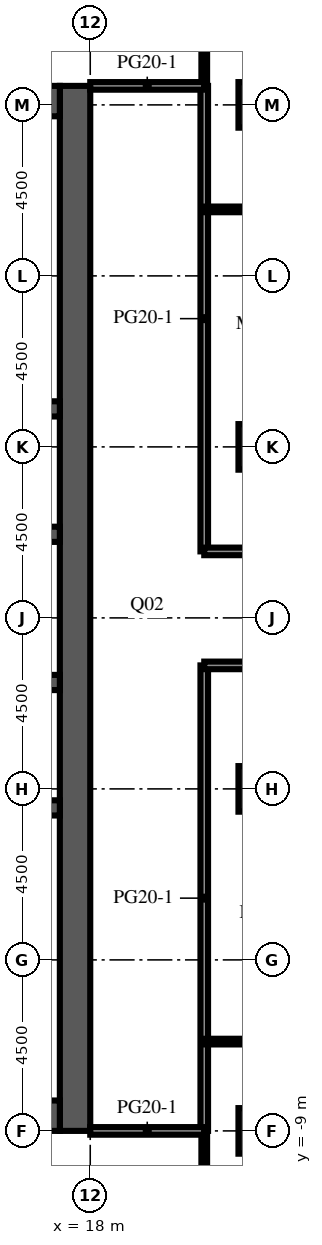
"""IFC4 building model, lengths in metres.
Left out: names, types, materials, properties, quantities, classifications, styles, units other than length and angle.
Written with IfcOpenShell. Run it as: python <this file> out.ifc"""

import sys

from ifc_helpers import new_model, si_unit, direction, frame, frame_2d, origin, origin_2d, place, context, subcontext, project, spatial, rectangle, extrude, element, fill, save


model = new_model("IFC4")
c1 = context("Model", 3, precision=1e-05, world=origin(), true_north=direction((0.0, 1.0)))
c2 = subcontext(c1, "Body", "Model", "MODEL_VIEW")
j1 = project(units=[si_unit("LENGTHUNIT", "METRE"), si_unit("PLANEANGLEUNIT", "RADIAN")], contexts=[c1])
p1 = place(None, origin())
s1 = spatial("IfcSite", under=j1, at=p1, CompositionType="ELEMENT")
p2 = place(p1, origin())
s2 = spatial("IfcBuilding", under=s1, at=p2, CompositionType="ELEMENT")
p3 = place(p2, frame((0.0, 0.0, 191.5)))
s3 = spatial("IfcBuildingStorey", under=s2, at=p3, CompositionType="ELEMENT", Elevation=191.5)
for number, where, z_axis, x_axis in (
    (1, (22.5, -9.0, -0.45), (0.0, 0.0, 1.0), (1.0, 0.0, 0.0)),
    (2, (22.5, 0.0, -0.45), (0.0, 0.0, 1.0), (1.0, 0.0, 0.0)),
    (3, (22.5, 9.0, -0.45), (0.0, 0.0, 1.0), (1.0, 0.0, 0.0)),
    (4, (22.5, 18.0, -0.45), (0.0, 0.0, 1.0), (1.0, 0.0, 0.0)),
):
    element("IfcColumn", number, at=place(p3, frame(where, z_axis=z_axis, x_axis=x_axis)), inside=s3, PredefinedType="COLUMN", context=c2, shape_type="SweptSolid", body=[
        extrude(rectangle(XDim=1.2, YDim=1.2, at=origin_2d()), origin(), (0.0, 0.0, 1.0), 4.55),
    ])
p4 = place(p3, frame((17.6, -9.0, 0.0), z_axis=(0.0, 0.0, 1.0), x_axis=(0.0, 1.0, 0.0)))
e5 = element("IfcWall", 5, at=p4, inside=s3, PredefinedType="SHEAR", context=c2, shape_type="SweptSolid", body=[
    extrude(rectangle(XDim=27.5, YDim=0.8, at=frame_2d((13.75, 0.0))), origin(), (0.0, 0.0, 1.0), 4.1),
])
p5 = place(p4, frame((12.55, 0.0, 0.0)))
e6 = element("IfcOpeningElement", 6, at=p5, cuts=e5, PredefinedType="OPENING", context=c2, shape_type="SweptSolid", body=[
    extrude(rectangle(XDim=2.4, YDim=2.4, at=frame_2d((1.2, 1.2))), frame((0.0, 0.41, 0.0), z_axis=(0.0, -1.0, 0.0), x_axis=(1.0, 0.0, 0.0)), (0.0, 0.0, 1.0), 0.82),
])
p6 = place(p4, frame((6.825, 0.0, 0.0)))
e7 = element("IfcOpeningElement", 7, at=p6, cuts=e5, PredefinedType="OPENING", context=c2, shape_type="SweptSolid", body=[
    extrude(rectangle(XDim=1.2, YDim=2.1, at=frame_2d((0.6, 1.05))), frame((0.0, 0.41, 0.0), z_axis=(0.0, -1.0, 0.0), x_axis=(1.0, 0.0, 0.0)), (0.0, 0.0, 1.0), 0.82),
])
p7 = place(p4, frame((19.475, 0.0, 0.0)))
e8 = element("IfcOpeningElement", 8, at=p7, cuts=e5, PredefinedType="OPENING", context=c2, shape_type="SweptSolid", body=[
    extrude(rectangle(XDim=1.2, YDim=2.1, at=frame_2d((0.6, 1.05))), frame((0.0, 0.41, 0.0), z_axis=(0.0, -1.0, 0.0), x_axis=(1.0, 0.0, 0.0)), (0.0, 0.0, 1.0), 0.82),
])
for number, where, z_axis, x_axis in (
    (9, (6.8, -8.6, 0.0), (0.0, 0.0, 1.0), (1.0, 0.0, 0.0)),
    (10, (6.8, 18.1, 0.0), (0.0, 0.0, 1.0), (1.0, 0.0, 0.0)),
):
    element("IfcWall", number, at=place(p3, frame(where, z_axis=z_axis, x_axis=x_axis)), inside=s3, PredefinedType="SHEAR", context=c2, shape_type="SweptSolid", body=[
        extrude(rectangle(XDim=10.4, YDim=0.8, at=frame_2d((5.2, 0.0))), origin(), (0.0, 0.0, 1.0), 4.1),
    ])
p8 = place(p3, frame((6.8, -0.5, 0.0), z_axis=(0.0, 0.0, 1.0), x_axis=(1.0, 0.0, 0.0)))
e11 = element("IfcWall", 11, at=p8, inside=s3, PredefinedType="SHEAR", context=c2, shape_type="SweptSolid", body=[
    extrude(rectangle(XDim=10.4, YDim=0.4, at=frame_2d((5.2, 0.0))), origin(), (0.0, 0.0, 1.0), 4.1),
])
p9 = place(p3, frame((6.8, 2.8, 0.0), z_axis=(0.0, 0.0, 1.0), x_axis=(1.0, 0.0, 0.0)))
e12 = element("IfcWall", 12, at=p9, inside=s3, PredefinedType="SHEAR", context=c2, shape_type="SweptSolid", body=[
    extrude(rectangle(XDim=10.4, YDim=0.4, at=frame_2d((5.2, 0.0))), origin(), (0.0, 0.0, 1.0), 4.1),
])
p10 = place(p9, frame((0.738, 0.0, 0.0)))
e13 = element("IfcOpeningElement", 13, at=p10, cuts=e12, PredefinedType="OPENING", context=c2, shape_type="SweptSolid", body=[
    extrude(rectangle(XDim=1.1, YDim=2.1, at=frame_2d((0.55, 1.05))), frame((0.0, 0.21, 0.0), z_axis=(0.0, -1.0, 0.0), x_axis=(1.0, 0.0, 0.0)), (0.0, 0.0, 1.0), 0.42),
])
p11 = place(p9, frame((3.337, 0.0, 0.0)))
e14 = element("IfcOpeningElement", 14, at=p11, cuts=e12, PredefinedType="OPENING", context=c2, shape_type="SweptSolid", body=[
    extrude(rectangle(XDim=1.1, YDim=2.1, at=frame_2d((0.55, 1.05))), frame((0.0, 0.21, 0.0), z_axis=(0.0, -1.0, 0.0), x_axis=(1.0, 0.0, 0.0)), (0.0, 0.0, 1.0), 0.42),
])
p12 = place(p9, frame((6.012, 0.0, 0.0)))
e15 = element("IfcOpeningElement", 15, at=p12, cuts=e12, PredefinedType="OPENING", context=c2, shape_type="SweptSolid", body=[
    extrude(rectangle(XDim=1.0, YDim=2.1, at=frame_2d((0.5, 1.05))), frame((0.0, 0.21, 0.0), z_axis=(0.0, -1.0, 0.0), x_axis=(1.0, 0.0, 0.0)), (0.0, 0.0, 1.0), 0.42),
])
p13 = place(p9, frame((8.613, 0.0, 0.0)))
e16 = element("IfcOpeningElement", 16, at=p13, cuts=e12, PredefinedType="OPENING", context=c2, shape_type="SweptSolid", body=[
    extrude(rectangle(XDim=1.0, YDim=2.1, at=frame_2d((0.5, 1.05))), frame((0.0, 0.21, 0.0), z_axis=(0.0, -1.0, 0.0), x_axis=(1.0, 0.0, 0.0)), (0.0, 0.0, 1.0), 0.42),
])
p14 = place(p3, frame((6.8, 6.7, 0.0), z_axis=(0.0, 0.0, 1.0), x_axis=(1.0, 0.0, 0.0)))
e17 = element("IfcWall", 17, at=p14, inside=s3, PredefinedType="SHEAR", context=c2, shape_type="SweptSolid", body=[
    extrude(rectangle(XDim=10.4, YDim=0.4, at=frame_2d((5.2, 0.0))), origin(), (0.0, 0.0, 1.0), 4.1),
])
p15 = place(p14, frame((3.337, 0.0, 0.0)))
e18 = element("IfcOpeningElement", 18, at=p15, cuts=e17, PredefinedType="OPENING", context=c2, shape_type="SweptSolid", body=[
    extrude(rectangle(XDim=1.1, YDim=2.1, at=frame_2d((0.55, 1.05))), frame((0.0, 0.21, 0.0), z_axis=(0.0, -1.0, 0.0), x_axis=(1.0, 0.0, 0.0)), (0.0, 0.0, 1.0), 0.42),
])
p16 = place(p14, frame((5.962, 0.0, 0.0)))
e19 = element("IfcOpeningElement", 19, at=p16, cuts=e17, PredefinedType="OPENING", context=c2, shape_type="SweptSolid", body=[
    extrude(rectangle(XDim=1.1, YDim=2.1, at=frame_2d((0.55, 1.05))), frame((0.0, 0.21, 0.0), z_axis=(0.0, -1.0, 0.0), x_axis=(1.0, 0.0, 0.0)), (0.0, 0.0, 1.0), 0.42),
])
p17 = place(p14, frame((8.663, 0.0, 0.0)))
e20 = element("IfcOpeningElement", 20, at=p17, cuts=e17, PredefinedType="OPENING", context=c2, shape_type="SweptSolid", body=[
    extrude(rectangle(XDim=1.1, YDim=2.1, at=frame_2d((0.55, 1.05))), frame((0.0, 0.21, 0.0), z_axis=(0.0, -1.0, 0.0), x_axis=(1.0, 0.0, 0.0)), (0.0, 0.0, 1.0), 0.42),
])
p18 = place(p14, frame((0.688, 0.0, 0.0)))
e21 = element("IfcOpeningElement", 21, at=p18, cuts=e17, PredefinedType="OPENING", context=c2, shape_type="SweptSolid", body=[
    extrude(rectangle(XDim=1.0, YDim=2.1, at=frame_2d((0.5, 1.05))), frame((0.0, 0.21, 0.0), z_axis=(0.0, -1.0, 0.0), x_axis=(1.0, 0.0, 0.0)), (0.0, 0.0, 1.0), 0.42),
])
p19 = place(p3, frame((6.8, 10.0, 0.0), z_axis=(0.0, 0.0, 1.0), x_axis=(1.0, 0.0, 0.0)))
e22 = element("IfcWall", 22, at=p19, inside=s3, PredefinedType="SHEAR", context=c2, shape_type="SweptSolid", body=[
    extrude(rectangle(XDim=10.4, YDim=0.4, at=frame_2d((5.2, 0.0))), origin(), (0.0, 0.0, 1.0), 4.1),
])
p20 = place(p3, frame((21.0, -26.85, 0.0), z_axis=(0.0, 0.0, 1.0), x_axis=(0.0, 1.0, 0.0)))
e23 = element("IfcWall", 23, at=p20, inside=s3, PredefinedType="PARTITIONING", context=c2, shape_type="SweptSolid", body=[
    extrude(rectangle(XDim=17.85, YDim=0.15, at=frame_2d((8.925, 0.0))), origin(), (0.0, 0.0, 1.0), 3.65),
])
p21 = place(p20, frame((12.55, 0.0, 0.0)))
e24 = element("IfcOpeningElement", 24, at=p21, cuts=e23, PredefinedType="OPENING", context=c2, shape_type="SweptSolid", body=[
    extrude(rectangle(XDim=1.0, YDim=2.1, at=frame_2d((0.5, 1.05))), frame((0.0, 0.085, 0.0), z_axis=(0.0, -1.0, 0.0), x_axis=(1.0, 0.0, 0.0)), (0.0, 0.0, 1.0), 0.17),
])
p22 = place(p3, frame((21.0, 18.5, 0.0), z_axis=(0.0, 0.0, 1.0), x_axis=(0.0, 1.0, 0.0)))
e25 = element("IfcWall", 25, at=p22, inside=s3, PredefinedType="PARTITIONING", context=c2, shape_type="SweptSolid", body=[
    extrude(rectangle(XDim=8.35, YDim=0.15, at=frame_2d((4.175, 0.0))), origin(), (0.0, 0.0, 1.0), 3.65),
])
p23 = place(p22, frame((4.85, 0.0, 0.0)))
e26 = element("IfcOpeningElement", 26, at=p23, cuts=e25, PredefinedType="OPENING", context=c2, shape_type="SweptSolid", body=[
    extrude(rectangle(XDim=1.0, YDim=2.1, at=frame_2d((0.5, 1.05))), frame((0.0, 0.085, 0.0), z_axis=(0.0, -1.0, 0.0), x_axis=(1.0, 0.0, 0.0)), (0.0, 0.0, 1.0), 0.17),
])
for number, where, z_axis, x_axis in (
    (27, (21.0, -9.0, 0.0), (0.0, 0.0, 1.0), (0.0, 1.0, 0.0)),
    (28, (21.0, 6.25, 0.0), (0.0, 0.0, 1.0), (0.0, 1.0, 0.0)),
):
    element("IfcWall", number, at=place(p3, frame(where, z_axis=z_axis, x_axis=x_axis)), inside=s3, PredefinedType="PARTITIONING", context=c2, shape_type="SweptSolid", body=[
        extrude(rectangle(XDim=12.25, YDim=0.2, at=frame_2d((6.125, 0.0))), origin(), (0.0, 0.0, 1.0), 3.65),
    ])
p24 = place(p3, frame((18.0, -9.0, 0.0), z_axis=(0.0, 0.0, 1.0), x_axis=(1.0, 0.0, 0.0)))
e29 = element("IfcWall", 29, at=p24, inside=s3, PredefinedType="PARTITIONING", context=c2, shape_type="SweptSolid", body=[
    extrude(rectangle(XDim=3.0, YDim=0.2, at=frame_2d((1.5, 0.0))), origin(), (0.0, 0.0, 1.0), 3.65),
])
p25 = place(p3, frame((31.35, -6.65, 0.0), z_axis=(0.0, 0.0, 1.0), x_axis=(-1.0, 0.0, 0.0)))
e30 = element("IfcWall", 30, at=p25, inside=s3, PredefinedType="PARTITIONING", context=c2, shape_type="SweptSolid", body=[
    extrude(rectangle(XDim=10.35, YDim=0.15, at=frame_2d((5.175, 0.0))), origin(), (0.0, 0.0, 1.0), 3.65),
])
p26 = place(p25, frame((6.0, 0.0, 0.0)))
e31 = element("IfcOpeningElement", 31, at=p26, cuts=e30, PredefinedType="OPENING", context=c2, shape_type="SweptSolid", body=[
    extrude(rectangle(XDim=1.0, YDim=2.1, at=frame_2d((0.5, 1.05))), frame((0.0, 0.085, 0.0), z_axis=(0.0, -1.0, 0.0), x_axis=(1.0, 0.0, 0.0)), (0.0, 0.0, 1.0), 0.17),
])
p27 = place(p3, frame((31.35, 3.25, 0.0), z_axis=(0.0, 0.0, 1.0), x_axis=(-1.0, 0.0, 0.0)))
e32 = element("IfcWall", 32, at=p27, inside=s3, PredefinedType="PARTITIONING", context=c2, shape_type="SweptSolid", body=[
    extrude(rectangle(XDim=10.35, YDim=0.2, at=frame_2d((5.175, 0.0))), origin(), (0.0, 0.0, 1.0), 3.65),
])
p28 = place(p27, frame((2.75, 0.0, 0.0)))
e33 = element("IfcOpeningElement", 33, at=p28, cuts=e32, PredefinedType="OPENING", context=c2, shape_type="SweptSolid", body=[
    extrude(rectangle(XDim=1.0, YDim=2.1, at=frame_2d((0.5, 1.05))), frame((0.0, 0.11, 0.0), z_axis=(0.0, -1.0, 0.0), x_axis=(1.0, 0.0, 0.0)), (0.0, 0.0, 1.0), 0.22),
])
p29 = place(p3, frame((21.0, 6.25, 0.0), z_axis=(0.0, 0.0, 1.0), x_axis=(1.0, 0.0, 0.0)))
e34 = element("IfcWall", 34, at=p29, inside=s3, PredefinedType="PARTITIONING", context=c2, shape_type="SweptSolid", body=[
    extrude(rectangle(XDim=10.35, YDim=0.2, at=frame_2d((5.175, 0.0))), origin(), (0.0, 0.0, 1.0), 3.65),
])
p30 = place(p29, frame((4.35, 0.0, 0.0)))
e35 = element("IfcOpeningElement", 35, at=p30, cuts=e34, PredefinedType="OPENING", context=c2, shape_type="SweptSolid", body=[
    extrude(rectangle(XDim=1.0, YDim=2.1, at=frame_2d((0.5, 1.05))), frame((0.0, 0.11, 0.0), z_axis=(0.0, -1.0, 0.0), x_axis=(1.0, 0.0, 0.0)), (0.0, 0.0, 1.0), 0.22),
])
p31 = place(p3, frame((21.0, 15.25, 0.0), z_axis=(0.0, 0.0, 1.0), x_axis=(1.0, 0.0, 0.0)))
e36 = element("IfcWall", 36, at=p31, inside=s3, PredefinedType="PARTITIONING", context=c2, shape_type="SweptSolid", body=[
    extrude(rectangle(XDim=10.35, YDim=0.15, at=frame_2d((5.175, 0.0))), origin(), (0.0, 0.0, 1.0), 3.65),
])
p32 = place(p31, frame((6.6, 0.0, 0.0)))
e37 = element("IfcOpeningElement", 37, at=p32, cuts=e36, PredefinedType="OPENING", context=c2, shape_type="SweptSolid", body=[
    extrude(rectangle(XDim=1.0, YDim=2.1, at=frame_2d((0.5, 1.05))), frame((0.0, 0.085, 0.0), z_axis=(0.0, -1.0, 0.0), x_axis=(1.0, 0.0, 0.0)), (0.0, 0.0, 1.0), 0.17),
])
p33 = place(p3, frame((18.0, 18.5, 0.0), z_axis=(0.0, 0.0, 1.0), x_axis=(1.0, 0.0, 0.0)))
e38 = element("IfcWall", 38, at=p33, inside=s3, PredefinedType="PARTITIONING", context=c2, shape_type="SweptSolid", body=[
    extrude(rectangle(XDim=3.0, YDim=0.2, at=frame_2d((1.5, 0.0))), origin(), (0.0, 0.0, 1.0), 3.65),
])
p34 = place(p5, origin())
e39 = element("IfcDoor", 39, at=p34, inside=s3, OperationType="DOUBLE_DOOR_DOUBLE_SWING", PredefinedType="DOOR", context=c2, shape_type="SweptSolid", body=[
    extrude(rectangle(XDim=2.4, YDim=2.4, at=frame_2d((1.2, 1.2))), frame((0.0, 0.025, 0.0), z_axis=(0.0, -1.0, 0.0), x_axis=(1.0, 0.0, 0.0)), (0.0, 0.0, 1.0), 0.05),
])
fill(e6, e39)
p35 = place(p6, frame((1.2, 0.0, 0.0), z_axis=(0.0, 0.0, 1.0), x_axis=(-1.0, 0.0, 0.0)))
e40 = element("IfcDoor", 40, at=p35, inside=s3, OperationType="SINGLE_SWING_LEFT", PredefinedType="DOOR", context=c2, shape_type="SweptSolid", body=[
    extrude(rectangle(XDim=1.2, YDim=2.1, at=frame_2d((0.6, 1.05))), frame((0.0, 0.025, 0.0), z_axis=(0.0, -1.0, 0.0), x_axis=(1.0, 0.0, 0.0)), (0.0, 0.0, 1.0), 0.05),
])
fill(e7, e40)
p36 = place(p7, frame((1.2, 0.0, 0.0), z_axis=(0.0, 0.0, 1.0), x_axis=(-1.0, 0.0, 0.0)))
e41 = element("IfcDoor", 41, at=p36, inside=s3, OperationType="SINGLE_SWING_LEFT", PredefinedType="DOOR", context=c2, shape_type="SweptSolid", body=[
    extrude(rectangle(XDim=1.2, YDim=2.1, at=frame_2d((0.6, 1.05))), frame((0.0, 0.025, 0.0), z_axis=(0.0, -1.0, 0.0), x_axis=(1.0, 0.0, 0.0)), (0.0, 0.0, 1.0), 0.05),
])
fill(e8, e41)
save(model, sys.argv[1])
